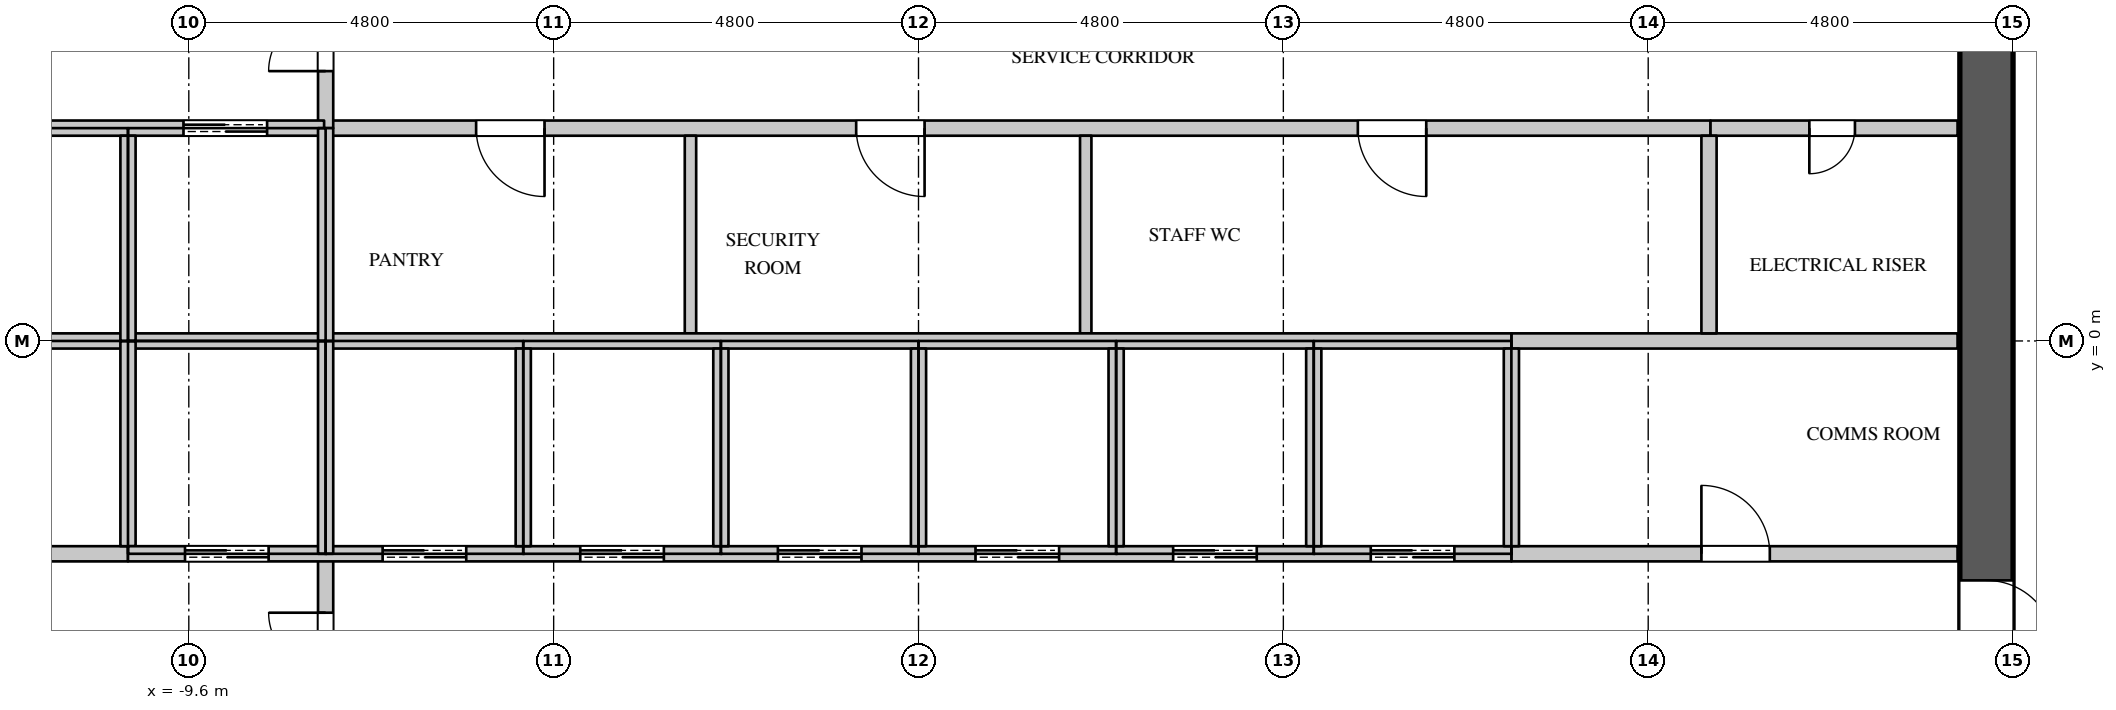
"""IFC4 building model, lengths in metres.
Left out: names, types, materials, properties, quantities, classifications, styles, units other than length and angle.
Written with IfcOpenShell. Run it as: python <this file> out.ifc"""

import sys

from ifc_helpers import new_model, si_unit, direction, frame, frame_2d, origin, place, context, subcontext, project, spatial, rectangle, extrude, element, fill, save


model = new_model("IFC4")
c1 = context("Model", 3, precision=1e-05, world=origin(), true_north=direction((0.0, 1.0)))
c2 = subcontext(c1, "Body", "Model", "MODEL_VIEW")
j1 = project(units=[si_unit("LENGTHUNIT", "METRE"), si_unit("PLANEANGLEUNIT", "RADIAN")], contexts=[c1])
p1 = place(None, origin())
s1 = spatial("IfcSite", under=j1, at=p1, CompositionType="ELEMENT")
p2 = place(p1, origin())
s2 = spatial("IfcBuilding", under=s1, at=p2, CompositionType="ELEMENT")
p3 = place(p2, frame((0.0, 0.0, 208.5)))
s3 = spatial("IfcBuildingStorey", under=s2, at=p3, CompositionType="ELEMENT", Elevation=208.5)
p4 = place(p3, frame((14.05, -11.3, 0.0), z_axis=(0.0, 0.0, 1.0), x_axis=(0.0, 1.0, 0.0)))
e1 = element("IfcWall", 1, at=p4, inside=s3, PredefinedType="SHEAR", context=c2, shape_type="SweptSolid", body=[
    extrude(rectangle(XDim=22.6, YDim=0.7, at=frame_2d((11.3, 0.0))), origin(), (0.0, 0.0, 1.0), 5.4),
])
p5 = place(p4, frame((20.5, 0.0, 0.0)))
e2 = element("IfcOpeningElement", 2, at=p5, cuts=e1, PredefinedType="OPENING", context=c2, shape_type="SweptSolid", body=[
    extrude(rectangle(XDim=1.1, YDim=2.2, at=frame_2d((0.55, 1.1))), frame((0.0, 0.36, 0.0), z_axis=(0.0, -1.0, 0.0), x_axis=(1.0, 0.0, 0.0)), (0.0, 0.0, 1.0), 0.72),
])
p6 = place(p4, frame((7.25, 0.0, 0.0)))
e3 = element("IfcOpeningElement", 3, at=p6, cuts=e1, PredefinedType="OPENING", context=c2, shape_type="SweptSolid", body=[
    extrude(rectangle(XDim=0.9, YDim=2.2, at=frame_2d((0.45, 1.1))), frame((0.0, 0.36, 0.0), z_axis=(0.0, -1.0, 0.0), x_axis=(1.0, 0.0, 0.0)), (0.0, 0.0, 1.0), 0.72),
])
p7 = place(p4, frame((1.0, 0.0, 0.0)))
e4 = element("IfcOpeningElement", 4, at=p7, cuts=e1, PredefinedType="OPENING", context=c2, shape_type="SweptSolid", body=[
    extrude(rectangle(XDim=1.1, YDim=2.2, at=frame_2d((0.55, 1.1))), frame((0.0, 0.36, 0.0), z_axis=(0.0, -1.0, 0.0), x_axis=(1.0, 0.0, 0.0)), (0.0, 0.0, 1.0), 0.72),
])
p8 = place(p4, frame((3.8, 0.0, 0.0)))
e5 = element("IfcOpeningElement", 5, at=p8, cuts=e1, PredefinedType="OPENING", context=c2, shape_type="SweptSolid", body=[
    extrude(rectangle(XDim=0.9, YDim=2.2, at=frame_2d((0.45, 1.1))), frame((0.0, 0.36, 0.0), z_axis=(0.0, -1.0, 0.0), x_axis=(1.0, 0.0, 0.0)), (0.0, 0.0, 1.0), 0.72),
])
p9 = place(p3, frame((-7.82, 2.8, 0.0), z_axis=(0.0, 0.0, 1.0), x_axis=(1.0, 0.0, 0.0)))
e6 = element("IfcWall", 6, at=p9, inside=s3, PredefinedType="PARTITIONING", context=c2, shape_type="SweptSolid", body=[
    extrude(rectangle(XDim=18.24, YDim=0.2, at=frame_2d((9.12, 0.0))), origin(), (0.0, 0.0, 1.0), 5.15),
])
p10 = place(p9, frame((2.0, 0.0, 0.0)))
e7 = element("IfcOpeningElement", 7, at=p10, cuts=e6, PredefinedType="OPENING", context=c2, shape_type="SweptSolid", body=[
    extrude(rectangle(XDim=0.9, YDim=2.2, at=frame_2d((0.45, 1.1))), frame((0.0, 0.11, 0.0), z_axis=(0.0, -1.0, 0.0), x_axis=(1.0, 0.0, 0.0)), (0.0, 0.0, 1.0), 0.22),
])
p11 = place(p9, frame((7.0, 0.0, 0.0)))
e8 = element("IfcOpeningElement", 8, at=p11, cuts=e6, PredefinedType="OPENING", context=c2, shape_type="SweptSolid", body=[
    extrude(rectangle(XDim=0.9, YDim=2.2, at=frame_2d((0.45, 1.1))), frame((0.0, 0.11, 0.0), z_axis=(0.0, -1.0, 0.0), x_axis=(1.0, 0.0, 0.0)), (0.0, 0.0, 1.0), 0.22),
])
p12 = place(p9, frame((13.6, 0.0, 0.0)))
e9 = element("IfcOpeningElement", 9, at=p12, cuts=e6, PredefinedType="OPENING", context=c2, shape_type="SweptSolid", body=[
    extrude(rectangle(XDim=0.9, YDim=2.2, at=frame_2d((0.45, 1.1))), frame((0.0, 0.11, 0.0), z_axis=(0.0, -1.0, 0.0), x_axis=(1.0, 0.0, 0.0)), (0.0, 0.0, 1.0), 0.22),
])
p13 = place(p3, frame((-7.8, -8.075, 0.0), z_axis=(0.0, 0.0, 1.0), x_axis=(0.0, 1.0, 0.0)))
e10 = element("IfcWall", 10, at=p13, inside=s3, PredefinedType="PARTITIONING", context=c2, shape_type="SweptSolid", body=[
    extrude(rectangle(XDim=5.275, YDim=0.2, at=frame_2d((2.637, 0.0))), origin(), (0.0, 0.0, 1.0), 5.15),
])
p14 = place(p13, frame((3.0, 0.0, 0.0)))
e11 = element("IfcOpeningElement", 11, at=p14, cuts=e10, PredefinedType="OPENING", context=c2, shape_type="SweptSolid", body=[
    extrude(rectangle(XDim=1.5, YDim=2.4, at=frame_2d((0.75, 1.2))), frame((0.0, 0.11, 0.0), z_axis=(0.0, -1.0, 0.0), x_axis=(1.0, 0.0, 0.0)), (0.0, 0.0, 1.0), 0.22),
])
p15 = place(p3, frame((-7.8, 2.8, 0.0), z_axis=(0.0, 0.0, 1.0), x_axis=(0.0, 1.0, 0.0)))
e12 = element("IfcWall", 12, at=p15, inside=s3, PredefinedType="PARTITIONING", context=c2, shape_type="SweptSolid", body=[
    extrude(rectangle(XDim=5.275, YDim=0.2, at=frame_2d((2.637, 0.0))), origin(), (0.0, 0.0, 1.0), 5.15),
])
p16 = place(p15, frame((0.75, 0.0, 0.0)))
e13 = element("IfcOpeningElement", 13, at=p16, cuts=e12, PredefinedType="OPENING", context=c2, shape_type="SweptSolid", body=[
    extrude(rectangle(XDim=1.5, YDim=2.4, at=frame_2d((0.75, 1.2))), frame((0.0, 0.11, 0.0), z_axis=(0.0, -1.0, 0.0), x_axis=(1.0, 0.0, 0.0)), (0.0, 0.0, 1.0), 0.22),
])
for number, where, z_axis, x_axis in (
    (14, (-3.0, 0.1, 0.0), (0.0, 0.0, 1.0), (0.0, 1.0, 0.0)),
    (15, (2.2, 0.1, 0.0), (0.0, 0.0, 1.0), (0.0, 1.0, 0.0)),
):
    element("IfcWall", number, at=place(p3, frame(where, z_axis=z_axis, x_axis=x_axis)), inside=s3, PredefinedType="PARTITIONING", context=c2, shape_type="SweptSolid", body=[
        extrude(rectangle(XDim=2.6, YDim=0.15, at=frame_2d((1.3, 0.0))), origin(), (0.0, 0.0, 1.0), 5.15),
    ])
p17 = place(p3, frame((-13.67, -2.8, 0.0), z_axis=(0.0, 0.0, 1.0), x_axis=(1.0, 0.0, 0.0)))
e16 = element("IfcWall", 16, at=p17, inside=s3, PredefinedType="PARTITIONING", context=c2, shape_type="SweptSolid", body=[
    extrude(rectangle(XDim=3.27, YDim=0.2, at=frame_2d((1.635, 0.0))), origin(), (0.0, 0.0, 1.0), 5.15),
])
p18 = place(p17, frame((1.3, 0.0, 0.0)))
e17 = element("IfcOpeningElement", 17, at=p18, cuts=e16, PredefinedType="OPENING", context=c2, shape_type="SweptSolid", body=[
    extrude(rectangle(XDim=0.6, YDim=2.0, at=frame_2d((0.3, 1.0))), frame((0.0, 0.11, 0.0), z_axis=(0.0, -1.0, 0.0), x_axis=(1.0, 0.0, 0.0)), (0.0, 0.0, 1.0), 0.22),
])
p19 = place(p3, frame((7.8, -2.8, 0.0), z_axis=(0.0, 0.0, 1.0), x_axis=(1.0, 0.0, 0.0)))
e18 = element("IfcWall", 18, at=p19, inside=s3, PredefinedType="PARTITIONING", context=c2, shape_type="SweptSolid", body=[
    extrude(rectangle(XDim=5.87, YDim=0.2, at=frame_2d((2.935, 0.0))), origin(), (0.0, 0.0, 1.0), 5.15),
])
p20 = place(p19, frame((2.5, 0.0, 0.0)))
e19 = element("IfcOpeningElement", 19, at=p20, cuts=e18, PredefinedType="OPENING", context=c2, shape_type="SweptSolid", body=[
    extrude(rectangle(XDim=0.9, YDim=2.2, at=frame_2d((0.45, 1.1))), frame((0.0, 0.11, 0.0), z_axis=(0.0, -1.0, 0.0), x_axis=(1.0, 0.0, 0.0)), (0.0, 0.0, 1.0), 0.22),
])
p21 = place(p3, frame((7.8, 0.0, 0.0), z_axis=(0.0, 0.0, 1.0), x_axis=(1.0, 0.0, 0.0)))
e20 = element("IfcWall", 20, at=p21, inside=s3, PredefinedType="PARTITIONING", context=c2, shape_type="SweptSolid", body=[
    extrude(rectangle(XDim=5.87, YDim=0.2, at=frame_2d((2.935, 0.0))), origin(), (0.0, 0.0, 1.0), 5.15),
])
p22 = place(p3, frame((10.42, 2.8, 0.0), z_axis=(0.0, 0.0, 1.0), x_axis=(1.0, 0.0, 0.0)))
e21 = element("IfcWall", 21, at=p22, inside=s3, PredefinedType="PARTITIONING", context=c2, shape_type="SweptSolid", body=[
    extrude(rectangle(XDim=3.25, YDim=0.2, at=frame_2d((1.625, 0.0))), origin(), (0.0, 0.0, 1.0), 5.15),
])
p23 = place(p22, frame((1.3, 0.0, 0.0)))
e22 = element("IfcOpeningElement", 22, at=p23, cuts=e21, PredefinedType="OPENING", context=c2, shape_type="SweptSolid", body=[
    extrude(rectangle(XDim=0.6, YDim=2.0, at=frame_2d((0.3, 1.0))), frame((0.0, 0.11, 0.0), z_axis=(0.0, -1.0, 0.0), x_axis=(1.0, 0.0, 0.0)), (0.0, 0.0, 1.0), 0.22),
])
p24 = place(p3, frame((10.4, 0.1, 0.0), z_axis=(0.0, 0.0, 1.0), x_axis=(0.0, 1.0, 0.0)))
e23 = element("IfcWall", 23, at=p24, inside=s3, PredefinedType="PARTITIONING", context=c2, shape_type="SweptSolid", body=[
    extrude(rectangle(XDim=2.6, YDim=0.2, at=frame_2d((1.3, 0.0))), origin(), (0.0, 0.0, 1.0), 5.15),
])
p25 = place(p3, frame((-13.67, 0.0, 0.0), z_axis=(0.0, 0.0, 1.0), x_axis=(1.0, 0.0, 0.0)))
e24 = element("IfcWall", 24, at=p25, inside=s3, PredefinedType="PARTITIONING", context=c2, shape_type="SweptSolid", body=[
    extrude(rectangle(XDim=21.47, YDim=0.2, at=frame_2d((10.735, 0.0))), origin(), (0.0, 0.0, 1.0), 5.15),
])
p26 = place(p3, frame((-13.67, 2.8, 0.0), z_axis=(0.0, 0.0, 1.0), x_axis=(1.0, 0.0, 0.0)))
e25 = element("IfcWall", 25, at=p26, inside=s3, PredefinedType="PARTITIONING", context=c2, shape_type="SweptSolid", body=[
    extrude(rectangle(XDim=5.85, YDim=0.2, at=frame_2d((2.925, 0.0))), origin(), (0.0, 0.0, 1.0), 5.15),
])
p27 = place(p26, frame((1.05, 0.0, 0.0)))
e26 = element("IfcOpeningElement", 26, at=p27, cuts=e25, PredefinedType="OPENING", context=c2, shape_type="SweptSolid", body=[
    extrude(rectangle(XDim=1.1, YDim=2.2, at=frame_2d((0.55, 1.1))), frame((0.0, 0.11, 0.0), z_axis=(0.0, -1.0, 0.0), x_axis=(1.0, 0.0, 0.0)), (0.0, 0.0, 1.0), 0.22),
])
p28 = place(p26, frame((4.0, 0.0, 0.0)))
e27 = element("IfcOpeningElement", 27, at=p28, cuts=e25, PredefinedType="OPENING", context=c2, shape_type="SweptSolid", body=[
    extrude(rectangle(XDim=1.1, YDim=2.2, at=frame_2d((0.55, 1.1))), frame((0.0, 0.11, 0.0), z_axis=(0.0, -1.0, 0.0), x_axis=(1.0, 0.0, 0.0)), (0.0, 0.0, 1.0), 0.22),
])
p29 = place(p3, frame((-10.4, -2.7, 0.0), z_axis=(0.0, 0.0, 1.0), x_axis=(0.0, 1.0, 0.0)))
e28 = element("IfcWall", 28, at=p29, inside=s3, PredefinedType="PARTITIONING", context=c2, shape_type="SweptSolid", body=[
    extrude(rectangle(XDim=2.7, YDim=0.2, at=frame_2d((1.35, 0.0))), origin(), (0.0, 0.0, 1.0), 5.15),
])
p30 = place(p3, frame((-10.4, -2.8, 0.0), z_axis=(0.0, 0.0, 1.0), x_axis=(1.0, 0.0, 0.0)))
e29 = element("IfcWall", 29, at=p30, inside=s3, PredefinedType="PARTITIONING", context=c2, shape_type="SweptSolid", body=[
    extrude(rectangle(XDim=18.2, YDim=0.2, at=frame_2d((9.1, 0.0))), origin(), (0.0, 0.0, 1.0), 5.15),
])
p31 = place(p30, frame((0.75, 0.0, 0.0)))
e30 = element("IfcOpeningElement", 30, at=p31, cuts=e29, PredefinedType="OPENING", context=c2, shape_type="SweptSolid", body=[
    extrude(rectangle(XDim=1.1, YDim=2.2, at=frame_2d((0.55, 1.1))), frame((0.0, 0.11, 0.0), z_axis=(0.0, -1.0, 0.0), x_axis=(1.0, 0.0, 0.0)), (0.0, 0.0, 1.0), 0.22),
])
p32 = place(p30, frame((3.35, 0.0, 0.0)))
e31 = element("IfcOpeningElement", 31, at=p32, cuts=e29, PredefinedType="OPENING", context=c2, shape_type="SweptSolid", body=[
    extrude(rectangle(XDim=1.1, YDim=2.2, at=frame_2d((0.55, 1.1))), frame((0.0, 0.11, 0.0), z_axis=(0.0, -1.0, 0.0), x_axis=(1.0, 0.0, 0.0)), (0.0, 0.0, 1.0), 0.22),
])
p33 = place(p30, frame((5.95, 0.0, 0.0)))
e32 = element("IfcOpeningElement", 32, at=p33, cuts=e29, PredefinedType="OPENING", context=c2, shape_type="SweptSolid", body=[
    extrude(rectangle(XDim=1.1, YDim=2.2, at=frame_2d((0.55, 1.1))), frame((0.0, 0.11, 0.0), z_axis=(0.0, -1.0, 0.0), x_axis=(1.0, 0.0, 0.0)), (0.0, 0.0, 1.0), 0.22),
])
p34 = place(p30, frame((8.55, 0.0, 0.0)))
e33 = element("IfcOpeningElement", 33, at=p34, cuts=e29, PredefinedType="OPENING", context=c2, shape_type="SweptSolid", body=[
    extrude(rectangle(XDim=1.1, YDim=2.2, at=frame_2d((0.55, 1.1))), frame((0.0, 0.11, 0.0), z_axis=(0.0, -1.0, 0.0), x_axis=(1.0, 0.0, 0.0)), (0.0, 0.0, 1.0), 0.22),
])
p35 = place(p30, frame((11.15, 0.0, 0.0)))
e34 = element("IfcOpeningElement", 34, at=p35, cuts=e29, PredefinedType="OPENING", context=c2, shape_type="SweptSolid", body=[
    extrude(rectangle(XDim=1.1, YDim=2.2, at=frame_2d((0.55, 1.1))), frame((0.0, 0.11, 0.0), z_axis=(0.0, -1.0, 0.0), x_axis=(1.0, 0.0, 0.0)), (0.0, 0.0, 1.0), 0.22),
])
p36 = place(p30, frame((13.75, 0.0, 0.0)))
e35 = element("IfcOpeningElement", 35, at=p36, cuts=e29, PredefinedType="OPENING", context=c2, shape_type="SweptSolid", body=[
    extrude(rectangle(XDim=1.1, YDim=2.2, at=frame_2d((0.55, 1.1))), frame((0.0, 0.11, 0.0), z_axis=(0.0, -1.0, 0.0), x_axis=(1.0, 0.0, 0.0)), (0.0, 0.0, 1.0), 0.22),
])
p37 = place(p30, frame((16.35, 0.0, 0.0)))
e36 = element("IfcOpeningElement", 36, at=p37, cuts=e29, PredefinedType="OPENING", context=c2, shape_type="SweptSolid", body=[
    extrude(rectangle(XDim=1.1, YDim=2.2, at=frame_2d((0.55, 1.1))), frame((0.0, 0.11, 0.0), z_axis=(0.0, -1.0, 0.0), x_axis=(1.0, 0.0, 0.0)), (0.0, 0.0, 1.0), 0.22),
])
p38 = place(p3, frame((-10.4, 0.0, 0.0), z_axis=(0.0, 0.0, 1.0), x_axis=(0.0, 1.0, 0.0)))
e37 = element("IfcWall", 37, at=p38, inside=s3, PredefinedType="PARTITIONING", context=c2, shape_type="SweptSolid", body=[
    extrude(rectangle(XDim=2.7, YDim=0.2, at=frame_2d((1.35, 0.0))), origin(), (0.0, 0.0, 1.0), 5.15),
])
for number, where, z_axis, x_axis in (
    (38, (-7.8, -2.8, 0.0), (0.0, 0.0, 1.0), (0.0, 1.0, 0.0)),
    (39, (-7.8, 0.0, 0.0), (0.0, 0.0, 1.0), (0.0, 1.0, 0.0)),
):
    element("IfcWall", number, at=place(p3, frame(where, z_axis=z_axis, x_axis=x_axis)), inside=s3, PredefinedType="PARTITIONING", context=c2, shape_type="SweptSolid", body=[
        extrude(rectangle(XDim=2.8, YDim=0.2, at=frame_2d((1.4, 0.0))), origin(), (0.0, 0.0, 1.0), 5.15),
    ])
for number, where, z_axis, x_axis in (
    (40, (-5.2, -2.7, 0.0), (0.0, 0.0, 1.0), (0.0, 1.0, 0.0)),
    (41, (-2.6, -2.7, 0.0), (0.0, 0.0, 1.0), (0.0, 1.0, 0.0)),
    (42, (0.0, -2.7, 0.0), (0.0, 0.0, 1.0), (0.0, 1.0, 0.0)),
    (43, (2.6, -2.7, 0.0), (0.0, 0.0, 1.0), (0.0, 1.0, 0.0)),
    (44, (5.2, -2.7, 0.0), (0.0, 0.0, 1.0), (0.0, 1.0, 0.0)),
    (45, (7.8, -2.7, 0.0), (0.0, 0.0, 1.0), (0.0, 1.0, 0.0)),
):
    element("IfcWall", number, at=place(p3, frame(where, z_axis=z_axis, x_axis=x_axis)), inside=s3, PredefinedType="PARTITIONING", context=c2, shape_type="SweptSolid", body=[
        extrude(rectangle(XDim=2.6, YDim=0.2, at=frame_2d((1.3, 0.0))), origin(), (0.0, 0.0, 1.0), 5.15),
    ])
p39 = place(p23, origin())
e46 = element("IfcDoor", 46, at=p39, inside=s3, OperationType="SINGLE_SWING_RIGHT", PredefinedType="DOOR", context=c2, shape_type="SweptSolid", body=[
    extrude(rectangle(XDim=0.6, YDim=2.0, at=frame_2d((0.3, 1.0))), frame((0.0, 0.025, 0.0), z_axis=(0.0, -1.0, 0.0), x_axis=(1.0, 0.0, 0.0)), (0.0, 0.0, 1.0), 0.05),
])
fill(e22, e46)
p40 = place(p20, origin())
e47 = element("IfcDoor", 47, at=p40, inside=s3, OperationType="SINGLE_SWING_LEFT", PredefinedType="DOOR", context=c2, shape_type="SweptSolid", body=[
    extrude(rectangle(XDim=0.9, YDim=2.2, at=frame_2d((0.45, 1.1))), frame((0.0, 0.025, 0.0), z_axis=(0.0, -1.0, 0.0), x_axis=(1.0, 0.0, 0.0)), (0.0, 0.0, 1.0), 0.05),
])
fill(e19, e47)
p41 = place(p10, origin())
e48 = element("IfcDoor", 48, at=p41, inside=s3, OperationType="SINGLE_SWING_LEFT", PredefinedType="DOOR", context=c2, shape_type="SweptSolid", body=[
    extrude(rectangle(XDim=0.9, YDim=2.2, at=frame_2d((0.45, 1.1))), frame((0.0, 0.025, 0.0), z_axis=(0.0, -1.0, 0.0), x_axis=(1.0, 0.0, 0.0)), (0.0, 0.0, 1.0), 0.05),
])
fill(e7, e48)
p42 = place(p11, origin())
e49 = element("IfcDoor", 49, at=p42, inside=s3, OperationType="SINGLE_SWING_LEFT", PredefinedType="DOOR", context=c2, shape_type="SweptSolid", body=[
    extrude(rectangle(XDim=0.9, YDim=2.2, at=frame_2d((0.45, 1.1))), frame((0.0, 0.025, 0.0), z_axis=(0.0, -1.0, 0.0), x_axis=(1.0, 0.0, 0.0)), (0.0, 0.0, 1.0), 0.05),
])
fill(e8, e49)
p43 = place(p12, origin())
e50 = element("IfcDoor", 50, at=p43, inside=s3, OperationType="SINGLE_SWING_LEFT", PredefinedType="DOOR", context=c2, shape_type="SweptSolid", body=[
    extrude(rectangle(XDim=0.9, YDim=2.2, at=frame_2d((0.45, 1.1))), frame((0.0, 0.025, 0.0), z_axis=(0.0, -1.0, 0.0), x_axis=(1.0, 0.0, 0.0)), (0.0, 0.0, 1.0), 0.05),
])
fill(e9, e50)
p44 = place(p28, origin())
e51 = element("IfcDoor", 51, at=p44, inside=s3, OperationType="DOUBLE_DOOR_SLIDING", PredefinedType="DOOR", context=c2, shape_type="SweptSolid", body=[
    extrude(rectangle(XDim=1.1, YDim=2.2, at=frame_2d((0.55, 1.1))), frame((0.0, 0.025, 0.0), z_axis=(0.0, -1.0, 0.0), x_axis=(1.0, 0.0, 0.0)), (0.0, 0.0, 1.0), 0.05),
])
fill(e27, e51)
p45 = place(p31, origin())
e52 = element("IfcDoor", 52, at=p45, inside=s3, OperationType="DOUBLE_DOOR_SLIDING", PredefinedType="DOOR", context=c2, shape_type="SweptSolid", body=[
    extrude(rectangle(XDim=1.1, YDim=2.2, at=frame_2d((0.55, 1.1))), frame((0.0, 0.025, 0.0), z_axis=(0.0, -1.0, 0.0), x_axis=(1.0, 0.0, 0.0)), (0.0, 0.0, 1.0), 0.05),
])
fill(e30, e52)
p46 = place(p32, origin())
e53 = element("IfcDoor", 53, at=p46, inside=s3, OperationType="DOUBLE_DOOR_SLIDING", PredefinedType="DOOR", context=c2, shape_type="SweptSolid", body=[
    extrude(rectangle(XDim=1.1, YDim=2.2, at=frame_2d((0.55, 1.1))), frame((0.0, 0.025, 0.0), z_axis=(0.0, -1.0, 0.0), x_axis=(1.0, 0.0, 0.0)), (0.0, 0.0, 1.0), 0.05),
])
fill(e31, e53)
p47 = place(p33, origin())
e54 = element("IfcDoor", 54, at=p47, inside=s3, OperationType="DOUBLE_DOOR_SLIDING", PredefinedType="DOOR", context=c2, shape_type="SweptSolid", body=[
    extrude(rectangle(XDim=1.1, YDim=2.2, at=frame_2d((0.55, 1.1))), frame((0.0, 0.025, 0.0), z_axis=(0.0, -1.0, 0.0), x_axis=(1.0, 0.0, 0.0)), (0.0, 0.0, 1.0), 0.05),
])
fill(e32, e54)
p48 = place(p34, origin())
e55 = element("IfcDoor", 55, at=p48, inside=s3, OperationType="DOUBLE_DOOR_SLIDING", PredefinedType="DOOR", context=c2, shape_type="SweptSolid", body=[
    extrude(rectangle(XDim=1.1, YDim=2.2, at=frame_2d((0.55, 1.1))), frame((0.0, 0.025, 0.0), z_axis=(0.0, -1.0, 0.0), x_axis=(1.0, 0.0, 0.0)), (0.0, 0.0, 1.0), 0.05),
])
fill(e33, e55)
p49 = place(p35, origin())
e56 = element("IfcDoor", 56, at=p49, inside=s3, OperationType="DOUBLE_DOOR_SLIDING", PredefinedType="DOOR", context=c2, shape_type="SweptSolid", body=[
    extrude(rectangle(XDim=1.1, YDim=2.2, at=frame_2d((0.55, 1.1))), frame((0.0, 0.025, 0.0), z_axis=(0.0, -1.0, 0.0), x_axis=(1.0, 0.0, 0.0)), (0.0, 0.0, 1.0), 0.05),
])
fill(e34, e56)
p50 = place(p36, origin())
e57 = element("IfcDoor", 57, at=p50, inside=s3, OperationType="DOUBLE_DOOR_SLIDING", PredefinedType="DOOR", context=c2, shape_type="SweptSolid", body=[
    extrude(rectangle(XDim=1.1, YDim=2.2, at=frame_2d((0.55, 1.1))), frame((0.0, 0.025, 0.0), z_axis=(0.0, -1.0, 0.0), x_axis=(1.0, 0.0, 0.0)), (0.0, 0.0, 1.0), 0.05),
])
fill(e35, e57)
p51 = place(p37, origin())
e58 = element("IfcDoor", 58, at=p51, inside=s3, OperationType="DOUBLE_DOOR_SLIDING", PredefinedType="DOOR", context=c2, shape_type="SweptSolid", body=[
    extrude(rectangle(XDim=1.1, YDim=2.2, at=frame_2d((0.55, 1.1))), frame((0.0, 0.025, 0.0), z_axis=(0.0, -1.0, 0.0), x_axis=(1.0, 0.0, 0.0)), (0.0, 0.0, 1.0), 0.05),
])
fill(e36, e58)
p52 = place(p16, origin())
e59 = element("IfcDoor", 59, at=p52, inside=s3, OperationType="DOUBLE_DOOR_SINGLE_SWING", PredefinedType="DOOR", context=c2, shape_type="SweptSolid", body=[
    extrude(rectangle(XDim=1.5, YDim=2.4, at=frame_2d((0.75, 1.2))), frame((0.0, 0.025, 0.0), z_axis=(0.0, -1.0, 0.0), x_axis=(1.0, 0.0, 0.0)), (0.0, 0.0, 1.0), 0.05),
])
fill(e13, e59)
p53 = place(p14, origin())
e60 = element("IfcDoor", 60, at=p53, inside=s3, OperationType="DOUBLE_DOOR_SINGLE_SWING", PredefinedType="DOOR", context=c2, shape_type="SweptSolid", body=[
    extrude(rectangle(XDim=1.5, YDim=2.4, at=frame_2d((0.75, 1.2))), frame((0.0, 0.025, 0.0), z_axis=(0.0, -1.0, 0.0), x_axis=(1.0, 0.0, 0.0)), (0.0, 0.0, 1.0), 0.05),
])
fill(e11, e60)
p54 = place(p6, origin())
e61 = element("IfcDoor", 61, at=p54, inside=s3, OperationType="SINGLE_SWING_RIGHT", PredefinedType="DOOR", context=c2, shape_type="SweptSolid", body=[
    extrude(rectangle(XDim=0.9, YDim=2.2, at=frame_2d((0.45, 1.1))), frame((0.0, -0.295, 0.0), z_axis=(0.0, -1.0, 0.0), x_axis=(1.0, 0.0, 0.0)), (0.0, 0.0, 1.0), 0.05),
])
fill(e3, e61)
save(model, sys.argv[1])
